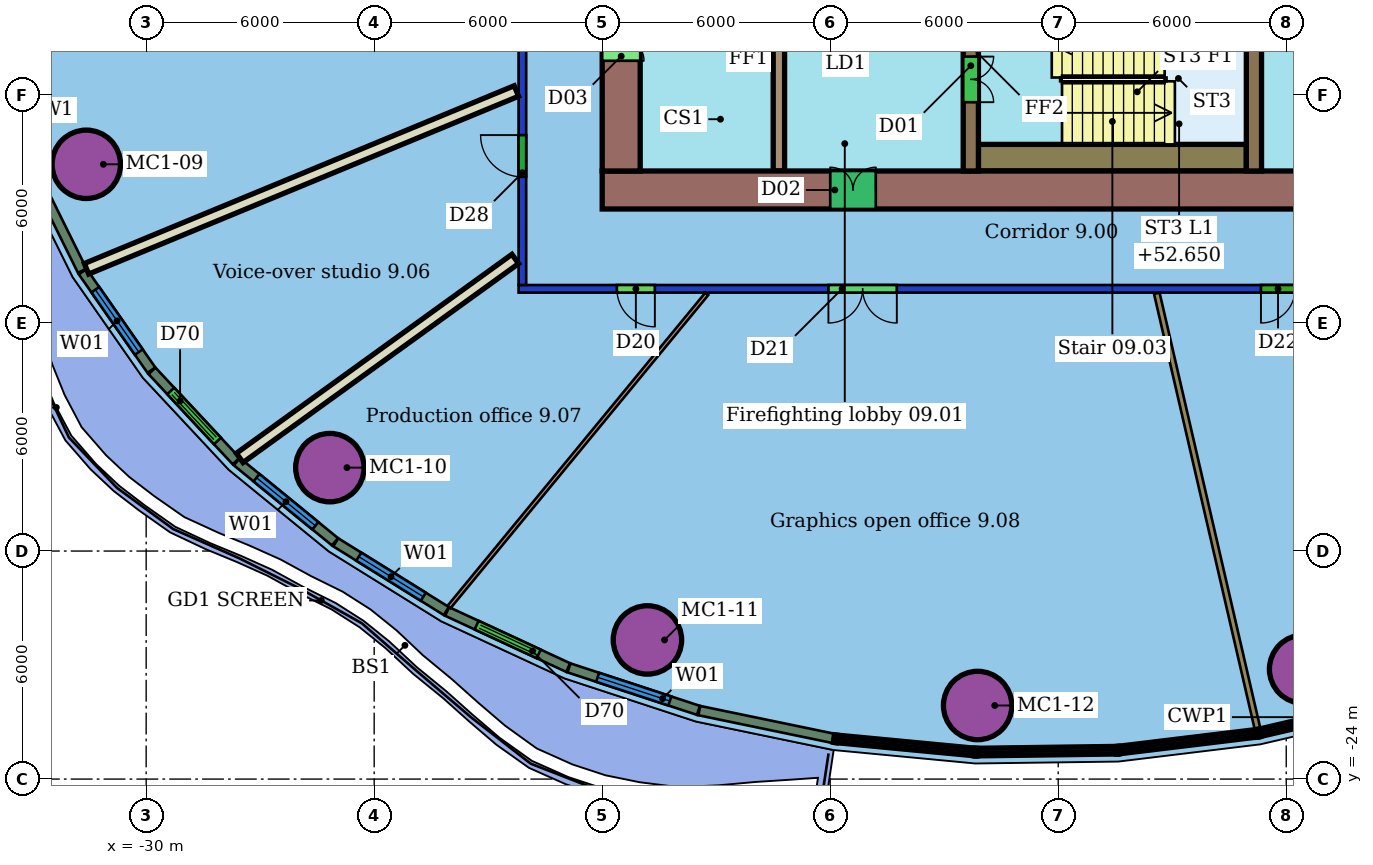
"""IFC4 building model, lengths in metres.
Left out: names, types, materials, properties, quantities, classifications, styles, units other than length and angle.
Written with IfcOpenShell. Run it as: python <this file> out.ifc"""

import sys

from ifc_helpers import new_model, si_unit, direction, frame, frame_2d, origin, origin_2d, place, context, subcontext, project, spatial, rectangle, hollow_circle, extrude, element, fill, save


model = new_model("IFC4")
c1 = context("Model", 3, precision=1e-05, world=origin(), true_north=direction((0.0, 1.0)))
c2 = subcontext(c1, "Body", "Model", "MODEL_VIEW")
j1 = project(units=[si_unit("LENGTHUNIT", "METRE"), si_unit("PLANEANGLEUNIT", "RADIAN")], contexts=[c1])
p1 = place(None, origin())
s1 = spatial("IfcSite", under=j1, at=p1, CompositionType="ELEMENT")
p2 = place(p1, origin())
s2 = spatial("IfcBuilding", under=s1, at=p2, CompositionType="ELEMENT")
p3 = place(p2, frame((0.0, 0.0, 50.8)))
s3 = spatial("IfcBuildingStorey", under=s2, at=p3, CompositionType="ELEMENT", Elevation=50.8)
for number, where, z_axis, x_axis in (
    (1, (-31.575, -7.824, 0.0), (0.0, 0.0, 1.0), (1.0, 0.0, 0.0)),
    (2, (-25.166, -15.805, 0.0), (0.0, 0.0, 1.0), (1.0, 0.0, 0.0)),
    (3, (-16.81, -20.339, 0.0), (0.0, 0.0, 1.0), (1.0, 0.0, 0.0)),
    (4, (-8.121, -22.064, 0.0), (0.0, 0.0, 1.0), (1.0, 0.0, 0.0)),
    (5, (0.458, -21.108, 0.0), (0.0, 0.0, 1.0), (1.0, 0.0, 0.0)),
):
    element("IfcColumn", number, at=place(p3, frame(where, z_axis=z_axis, x_axis=x_axis)), inside=s3, PredefinedType="COLUMN", context=c2, shape_type="SweptSolid", body=[
        extrude(hollow_circle(Radius=0.9, WallThickness=0.06, at=origin_2d()), origin(), (0.0, 0.0, 1.0), 3.55),
    ])
p4 = place(p3, frame((8.2, -11.1, 0.0), z_axis=(0.0, 0.0, 1.0), x_axis=(-1.0, 0.0, 0.0)))
e6 = element("IfcWall", 6, at=p4, inside=s3, PredefinedType="PARTITIONING", context=c2, shape_type="SweptSolid", body=[
    extrude(rectangle(XDim=28.4, YDim=0.2, at=frame_2d((14.2, 0.0))), origin(), (0.0, 0.0, 1.0), 2.85),
])
p5 = place(p4, frame((24.814, 0.0, 0.0)))
e7 = element("IfcOpeningElement", 7, at=p5, cuts=e6, PredefinedType="OPENING", context=c2, shape_type="SweptSolid", body=[
    extrude(rectangle(XDim=1.0, YDim=2.1, at=frame_2d((0.5, 1.05))), frame((0.0, 0.11, 0.0), z_axis=(0.0, -1.0, 0.0), x_axis=(1.0, 0.0, 0.0)), (0.0, 0.0, 1.0), 0.22),
])
p6 = place(p4, frame((18.447, 0.0, 0.0)))
e8 = element("IfcOpeningElement", 8, at=p6, cuts=e6, PredefinedType="OPENING", context=c2, shape_type="SweptSolid", body=[
    extrude(rectangle(XDim=1.8, YDim=2.1, at=frame_2d((0.9, 1.05))), frame((0.0, 0.11, 0.0), z_axis=(0.0, -1.0, 0.0), x_axis=(1.0, 0.0, 0.0)), (0.0, 0.0, 1.0), 0.22),
])
p7 = place(p4, frame((7.966, 0.0, 0.0)))
e9 = element("IfcOpeningElement", 9, at=p7, cuts=e6, PredefinedType="OPENING", context=c2, shape_type="SweptSolid", body=[
    extrude(rectangle(XDim=0.9, YDim=2.1, at=frame_2d((0.45, 1.05))), frame((0.0, 0.11, 0.0), z_axis=(0.0, -1.0, 0.0), x_axis=(1.0, 0.0, 0.0)), (0.0, 0.0, 1.0), 0.22),
])
p8 = place(p3, frame((-20.1, -11.0, 0.0), z_axis=(0.0, 0.0, 1.0), x_axis=(0.0, 1.0, 0.0)))
e10 = element("IfcWall", 10, at=p8, inside=s3, PredefinedType="PARTITIONING", context=c2, shape_type="SweptSolid", body=[
    extrude(rectangle(XDim=22.0, YDim=0.2, at=frame_2d((11.0, 0.0))), origin(), (0.0, 0.0, 1.0), 2.85),
])
p9 = place(p8, frame((11.659, 0.0, 0.0)))
e11 = element("IfcOpeningElement", 11, at=p9, cuts=e10, PredefinedType="OPENING", context=c2, shape_type="SweptSolid", body=[
    extrude(rectangle(XDim=1.8, YDim=2.1, at=frame_2d((0.9, 1.05))), frame((0.0, 0.11, 0.0), z_axis=(0.0, -1.0, 0.0), x_axis=(1.0, 0.0, 0.0)), (0.0, 0.0, 1.0), 0.22),
])
p10 = place(p8, frame((2.844, 0.0, 0.0)))
e12 = element("IfcOpeningElement", 12, at=p10, cuts=e10, PredefinedType="OPENING", context=c2, shape_type="SweptSolid", body=[
    extrude(rectangle(XDim=1.1, YDim=2.1, at=frame_2d((0.55, 1.05))), frame((0.0, 0.11, 0.0), z_axis=(0.0, -1.0, 0.0), x_axis=(1.0, 0.0, 0.0)), (0.0, 0.0, 1.0), 0.22),
])
p11 = place(p3, frame((-31.569, -10.573, 0.0), z_axis=(0.0, 0.0, 1.0), x_axis=(0.924113266053, 0.382118661551, 0.0)))
e13 = element("IfcWall", 13, at=p11, inside=s3, PredefinedType="PARTITIONING", context=c2, shape_type="SweptSolid", body=[
    extrude(rectangle(XDim=12.241, YDim=0.3, at=frame_2d((6.121, 0.0))), origin(), (0.0, 0.0, 1.0), 3.55),
])
p12 = place(p3, frame((-27.538, -15.549, 0.0), z_axis=(0.0, 0.0, 1.0), x_axis=(0.810780725644, 0.585349993528, 0.0)))
e14 = element("IfcWall", 14, at=p12, inside=s3, PredefinedType="PARTITIONING", context=c2, shape_type="SweptSolid", body=[
    extrude(rectangle(XDim=8.942, YDim=0.3, at=frame_2d((4.471, 0.0))), origin(), (0.0, 0.0, 1.0), 3.55),
])
p13 = place(p3, frame((-22.032, -19.475, 0.0), z_axis=(0.0, 0.0, 1.0), x_axis=(0.635562171799, 0.772049691262, 0.0)))
e15 = element("IfcWall", 15, at=p13, inside=s3, PredefinedType="PARTITIONING", context=c2, shape_type="SweptSolid", body=[
    extrude(rectangle(XDim=10.677, YDim=0.1, at=frame_2d((5.338, 0.0))), origin(), (0.0, 0.0, 1.0), 3.55),
])
p14 = place(p3, frame((-0.758, -22.668, 0.0), z_axis=(0.0, 0.0, 1.0), x_axis=(-0.225313080514, 0.974286413612, 0.0)))
e16 = element("IfcWall", 16, at=p14, inside=s3, PredefinedType="PARTITIONING", context=c2, shape_type="SweptSolid", body=[
    extrude(rectangle(XDim=11.753, YDim=0.15, at=frame_2d((5.877, 0.0))), origin(), (0.0, 0.0, 1.0), 3.55),
])
p15 = place(p3, frame((-33.036, -7.892, 0.0), z_axis=(0.0, 0.0, 1.0), x_axis=(0.443751201737, -0.896150027036, 0.0)))
e17 = element("IfcWall", 17, at=p15, inside=s3, PredefinedType="SOLIDWALL", context=c2, shape_type="SweptSolid", body=[
    extrude(rectangle(XDim=3.049, YDim=0.25, at=frame_2d((1.524, 0.0))), origin(), (0.0, 0.0, 1.0), 3.15),
])
p16 = place(p3, frame((-31.669, -10.647, 0.0), z_axis=(0.0, 0.0, 1.0), x_axis=(0.571854103807, -0.820355340056, 0.0)))
e18 = element("IfcWall", 18, at=p16, inside=s3, PredefinedType="SOLIDWALL", context=c2, shape_type="SweptSolid", body=[
    extrude(rectangle(XDim=3.161, YDim=0.25, at=frame_2d((1.58, 0.0))), origin(), (0.0, 0.0, 1.0), 3.15),
])
p17 = place(p16, frame((0.58, 0.0, 0.8)))
e19 = element("IfcOpeningElement", 19, at=p17, cuts=e18, PredefinedType="OPENING", context=c2, shape_type="SweptSolid", body=[
    extrude(rectangle(XDim=2.0, YDim=2.2, at=frame_2d((1.0, 1.1))), frame((0.0, 0.135, 0.0), z_axis=(0.0, -1.0, 0.0), x_axis=(1.0, 0.0, 0.0)), (0.0, 0.0, 1.0), 0.27),
])
p18 = place(p3, frame((-29.846, -13.26, 0.0), z_axis=(0.0, 0.0, 1.0), x_axis=(0.682457674527, -0.730925114139, 0.0)))
e20 = element("IfcWall", 20, at=p18, inside=s3, PredefinedType="SOLIDWALL", context=c2, shape_type="SweptSolid", body=[
    extrude(rectangle(XDim=3.244, YDim=0.25, at=frame_2d((1.622, 0.0))), origin(), (0.0, 0.0, 1.0), 3.15),
])
p19 = place(p18, frame((0.722, 0.0, 0.0)))
e21 = element("IfcOpeningElement", 21, at=p19, cuts=e20, PredefinedType="OPENING", context=c2, shape_type="SweptSolid", body=[
    extrude(rectangle(XDim=1.8, YDim=2.4, at=frame_2d((0.9, 1.2))), frame((0.0, 0.135, 0.0), z_axis=(0.0, -1.0, 0.0), x_axis=(1.0, 0.0, 0.0)), (0.0, 0.0, 1.0), 0.27),
])
p20 = place(p3, frame((-27.614, -15.648, 0.0), z_axis=(0.0, 0.0, 1.0), x_axis=(0.774781963818, -0.632228525569, 0.0)))
e22 = element("IfcWall", 22, at=p20, inside=s3, PredefinedType="SOLIDWALL", context=c2, shape_type="SweptSolid", body=[
    extrude(rectangle(XDim=3.334, YDim=0.25, at=frame_2d((1.667, 0.0))), origin(), (0.0, 0.0, 1.0), 3.15),
])
p21 = place(p20, frame((0.667, 0.0, 0.8)))
e23 = element("IfcOpeningElement", 23, at=p21, cuts=e22, PredefinedType="OPENING", context=c2, shape_type="SweptSolid", body=[
    extrude(rectangle(XDim=2.0, YDim=2.2, at=frame_2d((1.0, 1.1))), frame((0.0, 0.135, 0.0), z_axis=(0.0, -1.0, 0.0), x_axis=(1.0, 0.0, 0.0)), (0.0, 0.0, 1.0), 0.27),
])
p22 = place(p3, frame((-25.011, -17.771, 0.0), z_axis=(0.0, 0.0, 1.0), x_axis=(0.849344913238, -0.527838250184, 0.0)))
e24 = element("IfcWall", 24, at=p22, inside=s3, PredefinedType="SOLIDWALL", context=c2, shape_type="SweptSolid", body=[
    extrude(rectangle(XDim=3.426, YDim=0.25, at=frame_2d((1.713, 0.0))), origin(), (0.0, 0.0, 1.0), 3.15),
])
p23 = place(p22, frame((0.713, 0.0, 0.8)))
e25 = element("IfcOpeningElement", 25, at=p23, cuts=e24, PredefinedType="OPENING", context=c2, shape_type="SweptSolid", body=[
    extrude(rectangle(XDim=2.0, YDim=2.2, at=frame_2d((1.0, 1.1))), frame((0.0, 0.135, 0.0), z_axis=(0.0, -1.0, 0.0), x_axis=(1.0, 0.0, 0.0)), (0.0, 0.0, 1.0), 0.27),
])
p24 = place(p3, frame((-22.081, -19.59, 0.0), z_axis=(0.0, 0.0, 1.0), x_axis=(0.907313194359, -0.420455428484, 0.0)))
e26 = element("IfcWall", 26, at=p24, inside=s3, PredefinedType="SOLIDWALL", context=c2, shape_type="SweptSolid", body=[
    extrude(rectangle(XDim=3.511, YDim=0.25, at=frame_2d((1.756, 0.0))), origin(), (0.0, 0.0, 1.0), 3.15),
])
p25 = place(p24, frame((0.856, 0.0, 0.0)))
e27 = element("IfcOpeningElement", 27, at=p25, cuts=e26, PredefinedType="OPENING", context=c2, shape_type="SweptSolid", body=[
    extrude(rectangle(XDim=1.8, YDim=2.4, at=frame_2d((0.9, 1.2))), frame((0.0, 0.135, 0.0), z_axis=(0.0, -1.0, 0.0), x_axis=(1.0, 0.0, 0.0)), (0.0, 0.0, 1.0), 0.27),
])
p26 = place(p3, frame((-18.874, -21.074, 0.0), z_axis=(0.0, 0.0, 1.0), x_axis=(0.950176997657, -0.311710880662, 0.0)))
e28 = element("IfcWall", 28, at=p26, inside=s3, PredefinedType="SOLIDWALL", context=c2, shape_type="SweptSolid", body=[
    extrude(rectangle(XDim=3.586, YDim=0.25, at=frame_2d((1.793, 0.0))), origin(), (0.0, 0.0, 1.0), 3.15),
])
p27 = place(p26, frame((0.793, 0.0, 0.8)))
e29 = element("IfcOpeningElement", 29, at=p27, cuts=e28, PredefinedType="OPENING", context=c2, shape_type="SweptSolid", body=[
    extrude(rectangle(XDim=2.0, YDim=2.2, at=frame_2d((1.0, 1.1))), frame((0.0, 0.135, 0.0), z_axis=(0.0, -1.0, 0.0), x_axis=(1.0, 0.0, 0.0)), (0.0, 0.0, 1.0), 0.27),
])
p28 = place(p3, frame((-15.445, -22.198, 0.0), z_axis=(0.0, 0.0, 1.0), x_axis=(0.979196383513, -0.202914865188, 0.0)))
e30 = element("IfcWall", 30, at=p28, inside=s3, PredefinedType="SOLIDWALL", context=c2, shape_type="SweptSolid", body=[
    extrude(rectangle(XDim=3.602, YDim=0.25, at=frame_2d((1.801, 0.0))), origin(), (0.0, 0.0, 1.0), 3.15),
])
p29 = place(p3, frame((-18.0, -8.5, 0.0), z_axis=(0.0, 0.0, 1.0), x_axis=(1.0, 0.0, 0.0)))
e31 = element("IfcWall", 31, at=p29, inside=s3, PredefinedType="SHEAR", context=c2, shape_type="SweptSolid", body=[
    extrude(rectangle(XDim=24.0, YDim=1.0, at=frame_2d((12.0, 0.0))), origin(), (0.0, 0.0, 1.0), 3.4),
])
p30 = place(p29, frame((6.0, 0.0, 0.0)))
e32 = element("IfcOpeningElement", 32, at=p30, cuts=e31, PredefinedType="OPENING", context=c2, shape_type="SweptSolid", body=[
    extrude(rectangle(XDim=1.2, YDim=2.1, at=frame_2d((0.6, 1.05))), frame((0.0, 0.51, 0.0), z_axis=(0.0, -1.0, 0.0), x_axis=(1.0, 0.0, 0.0)), (0.0, 0.0, 1.0), 1.02),
])
p31 = place(p3, frame((-17.5, 8.0, 0.0), z_axis=(0.0, 0.0, 1.0), x_axis=(0.0, -1.0, 0.0)))
e33 = element("IfcWall", 33, at=p31, inside=s3, PredefinedType="SHEAR", context=c2, shape_type="SweptSolid", body=[
    extrude(rectangle(XDim=16.0, YDim=1.0, at=frame_2d((8.0, 0.0))), origin(), (0.0, 0.0, 1.0), 3.4),
])
p32 = place(p31, frame((11.9, 0.0, 0.0)))
e34 = element("IfcOpeningElement", 34, at=p32, cuts=e33, PredefinedType="OPENING", context=c2, shape_type="SweptSolid", body=[
    extrude(rectangle(XDim=1.2, YDim=2.1, at=frame_2d((0.6, 1.05))), frame((0.0, 0.51, 0.0), z_axis=(0.0, -1.0, 0.0), x_axis=(1.0, 0.0, 0.0)), (0.0, 0.0, 1.0), 1.02),
])
p33 = place(p31, frame((2.9, 0.0, 0.0)))
e35 = element("IfcOpeningElement", 35, at=p33, cuts=e33, PredefinedType="OPENING", context=c2, shape_type="SweptSolid", body=[
    extrude(rectangle(XDim=1.2, YDim=2.1, at=frame_2d((0.6, 1.05))), frame((0.0, 0.51, 0.0), z_axis=(0.0, -1.0, 0.0), x_axis=(1.0, 0.0, 0.0)), (0.0, 0.0, 1.0), 1.02),
])
p34 = place(p3, frame((-13.35, 8.0, 0.0), z_axis=(0.0, 0.0, 1.0), x_axis=(0.0, -1.0, 0.0)))
e36 = element("IfcWall", 36, at=p34, inside=s3, PredefinedType="SHEAR", context=c2, shape_type="SweptSolid", body=[
    extrude(rectangle(XDim=16.0, YDim=0.3, at=frame_2d((8.0, 0.0))), origin(), (0.0, 0.0, 1.0), 3.4),
])
p35 = place(p34, frame((7.25, 0.0, 0.0)))
e37 = element("IfcOpeningElement", 37, at=p35, cuts=e36, PredefinedType="OPENING", context=c2, shape_type="SweptSolid", body=[
    extrude(rectangle(XDim=1.5, YDim=2.1, at=frame_2d((0.75, 1.05))), frame((0.0, 0.16, 0.0), z_axis=(0.0, -1.0, 0.0), x_axis=(1.0, 0.0, 0.0)), (0.0, 0.0, 1.0), 0.32),
])
p36 = place(p3, frame((-8.3, -3.88, 0.0), z_axis=(0.0, 0.0, 1.0), x_axis=(0.0, -1.0, 0.0)))
e38 = element("IfcWall", 38, at=p36, inside=s3, PredefinedType="SHEAR", context=c2, shape_type="SweptSolid", body=[
    extrude(rectangle(XDim=4.12, YDim=0.4, at=frame_2d((2.06, 0.0))), origin(), (0.0, 0.0, 1.0), 3.4),
])
p37 = place(p36, frame((1.11, 0.0, 0.0)))
e39 = element("IfcOpeningElement", 39, at=p37, cuts=e38, PredefinedType="OPENING", context=c2, shape_type="SweptSolid", body=[
    extrude(rectangle(XDim=1.2, YDim=2.1, at=frame_2d((0.6, 1.05))), frame((0.0, 0.21, 0.0), z_axis=(0.0, -1.0, 0.0), x_axis=(1.0, 0.0, 0.0)), (0.0, 0.0, 1.0), 0.42),
])
p38 = place(p3, frame((-0.85, -3.88, 0.0), z_axis=(0.0, 0.0, 1.0), x_axis=(0.0, -1.0, 0.0)))
e40 = element("IfcWall", 40, at=p38, inside=s3, PredefinedType="SHEAR", context=c2, shape_type="SweptSolid", body=[
    extrude(rectangle(XDim=4.12, YDim=0.4, at=frame_2d((2.06, 0.0))), origin(), (0.0, 0.0, 1.0), 3.4),
])
p39 = place(p3, frame((-8.1, -7.65, 0.0), z_axis=(0.0, 0.0, 1.0), x_axis=(1.0, 0.0, 0.0)))
e41 = element("IfcWall", 41, at=p39, inside=s3, PredefinedType="SHEAR", context=c2, shape_type="SweptSolid", body=[
    extrude(rectangle(XDim=7.05, YDim=0.7, at=frame_2d((3.525, 0.0))), origin(), (0.0, 0.0, 1.0), 3.4),
])
p40 = place(p10, origin())
e42 = element("IfcDoor", 42, at=p40, inside=s3, OperationType="SINGLE_SWING_RIGHT", PredefinedType="DOOR", context=c2, shape_type="SweptSolid", body=[
    extrude(rectangle(XDim=1.1, YDim=2.1, at=frame_2d((0.55, 1.05))), frame((0.0, 0.025, 0.0), z_axis=(0.0, -1.0, 0.0), x_axis=(1.0, 0.0, 0.0)), (0.0, 0.0, 1.0), 0.05),
])
fill(e12, e42)
p41 = place(p5, origin())
e43 = element("IfcDoor", 43, at=p41, inside=s3, OperationType="SINGLE_SWING_LEFT", PredefinedType="DOOR", context=c2, shape_type="SweptSolid", body=[
    extrude(rectangle(XDim=1.0, YDim=2.1, at=frame_2d((0.5, 1.05))), frame((0.0, 0.025, 0.0), z_axis=(0.0, -1.0, 0.0), x_axis=(1.0, 0.0, 0.0)), (0.0, 0.0, 1.0), 0.05),
])
fill(e7, e43)
p42 = place(p6, origin())
e44 = element("IfcDoor", 44, at=p42, inside=s3, OperationType="DOUBLE_DOOR_SINGLE_SWING", PredefinedType="DOOR", context=c2, shape_type="SweptSolid", body=[
    extrude(rectangle(XDim=1.8, YDim=2.1, at=frame_2d((0.9, 1.05))), frame((0.0, 0.025, 0.0), z_axis=(0.0, -1.0, 0.0), x_axis=(1.0, 0.0, 0.0)), (0.0, 0.0, 1.0), 0.05),
])
fill(e8, e44)
p43 = place(p7, origin())
e45 = element("IfcDoor", 45, at=p43, inside=s3, OperationType="SINGLE_SWING_RIGHT", PredefinedType="DOOR", context=c2, shape_type="SweptSolid", body=[
    extrude(rectangle(XDim=0.9, YDim=2.1, at=frame_2d((0.45, 1.05))), frame((0.0, 0.025, 0.0), z_axis=(0.0, -1.0, 0.0), x_axis=(1.0, 0.0, 0.0)), (0.0, 0.0, 1.0), 0.05),
])
fill(e9, e45)
p44 = place(p17, origin())
e46 = element("IfcWindow", 46, at=p44, inside=s3, PartitioningType="SINGLE_PANEL", PredefinedType="WINDOW", context=c2, shape_type="SweptSolid", body=[
    extrude(rectangle(XDim=2.0, YDim=2.2, at=frame_2d((1.0, 1.1))), frame((0.0, 0.03, 0.0), z_axis=(0.0, -1.0, 0.0), x_axis=(1.0, 0.0, 0.0)), (0.0, 0.0, 1.0), 0.06),
])
fill(e19, e46)
p45 = place(p19, origin())
e47 = element("IfcDoor", 47, at=p45, inside=s3, OperationType="DOUBLE_DOOR_SLIDING", PredefinedType="DOOR", context=c2, shape_type="SweptSolid", body=[
    extrude(rectangle(XDim=1.8, YDim=2.4, at=frame_2d((0.9, 1.2))), frame((0.0, 0.025, 0.0), z_axis=(0.0, -1.0, 0.0), x_axis=(1.0, 0.0, 0.0)), (0.0, 0.0, 1.0), 0.05),
])
fill(e21, e47)
p46 = place(p21, origin())
e48 = element("IfcWindow", 48, at=p46, inside=s3, PartitioningType="SINGLE_PANEL", PredefinedType="WINDOW", context=c2, shape_type="SweptSolid", body=[
    extrude(rectangle(XDim=2.0, YDim=2.2, at=frame_2d((1.0, 1.1))), frame((0.0, 0.03, 0.0), z_axis=(0.0, -1.0, 0.0), x_axis=(1.0, 0.0, 0.0)), (0.0, 0.0, 1.0), 0.06),
])
fill(e23, e48)
p47 = place(p23, origin())
e49 = element("IfcWindow", 49, at=p47, inside=s3, PartitioningType="SINGLE_PANEL", PredefinedType="WINDOW", context=c2, shape_type="SweptSolid", body=[
    extrude(rectangle(XDim=2.0, YDim=2.2, at=frame_2d((1.0, 1.1))), frame((0.0, 0.03, 0.0), z_axis=(0.0, -1.0, 0.0), x_axis=(1.0, 0.0, 0.0)), (0.0, 0.0, 1.0), 0.06),
])
fill(e25, e49)
p48 = place(p25, origin())
e50 = element("IfcDoor", 50, at=p48, inside=s3, OperationType="DOUBLE_DOOR_SLIDING", PredefinedType="DOOR", context=c2, shape_type="SweptSolid", body=[
    extrude(rectangle(XDim=1.8, YDim=2.4, at=frame_2d((0.9, 1.2))), frame((0.0, 0.025, 0.0), z_axis=(0.0, -1.0, 0.0), x_axis=(1.0, 0.0, 0.0)), (0.0, 0.0, 1.0), 0.05),
])
fill(e27, e50)
p49 = place(p27, origin())
e51 = element("IfcWindow", 51, at=p49, inside=s3, PartitioningType="SINGLE_PANEL", PredefinedType="WINDOW", context=c2, shape_type="SweptSolid", body=[
    extrude(rectangle(XDim=2.0, YDim=2.2, at=frame_2d((1.0, 1.1))), frame((0.0, 0.03, 0.0), z_axis=(0.0, -1.0, 0.0), x_axis=(1.0, 0.0, 0.0)), (0.0, 0.0, 1.0), 0.06),
])
fill(e29, e51)
p50 = place(p30, origin())
e52 = element("IfcDoor", 52, at=p50, inside=s3, OperationType="DOUBLE_DOOR_SINGLE_SWING", PredefinedType="NOTDEFINED", context=c2, shape_type="SweptSolid", body=[
    extrude(rectangle(XDim=1.2, YDim=2.1, at=frame_2d((0.6, 1.05))), frame((0.0, 0.025, 0.0), z_axis=(0.0, -1.0, 0.0), x_axis=(1.0, 0.0, 0.0)), (0.0, 0.0, 1.0), 0.05),
])
fill(e32, e52)
p51 = place(p32, origin())
e53 = element("IfcDoor", 53, at=p51, inside=s3, OperationType="DOUBLE_DOOR_SINGLE_SWING", PredefinedType="NOTDEFINED", context=c2, shape_type="SweptSolid", body=[
    extrude(rectangle(XDim=1.2, YDim=2.1, at=frame_2d((0.6, 1.05))), frame((0.0, 0.025, 0.0), z_axis=(0.0, -1.0, 0.0), x_axis=(1.0, 0.0, 0.0)), (0.0, 0.0, 1.0), 0.05),
])
fill(e34, e53)
p52 = place(p37, origin())
e54 = element("IfcDoor", 54, at=p52, inside=s3, OperationType="DOUBLE_DOOR_SINGLE_SWING", PredefinedType="NOTDEFINED", context=c2, shape_type="SweptSolid", body=[
    extrude(rectangle(XDim=1.2, YDim=2.1, at=frame_2d((0.6, 1.05))), frame((0.0, 0.025, 0.0), z_axis=(0.0, -1.0, 0.0), x_axis=(1.0, 0.0, 0.0)), (0.0, 0.0, 1.0), 0.05),
])
fill(e39, e54)
save(model, sys.argv[1])
